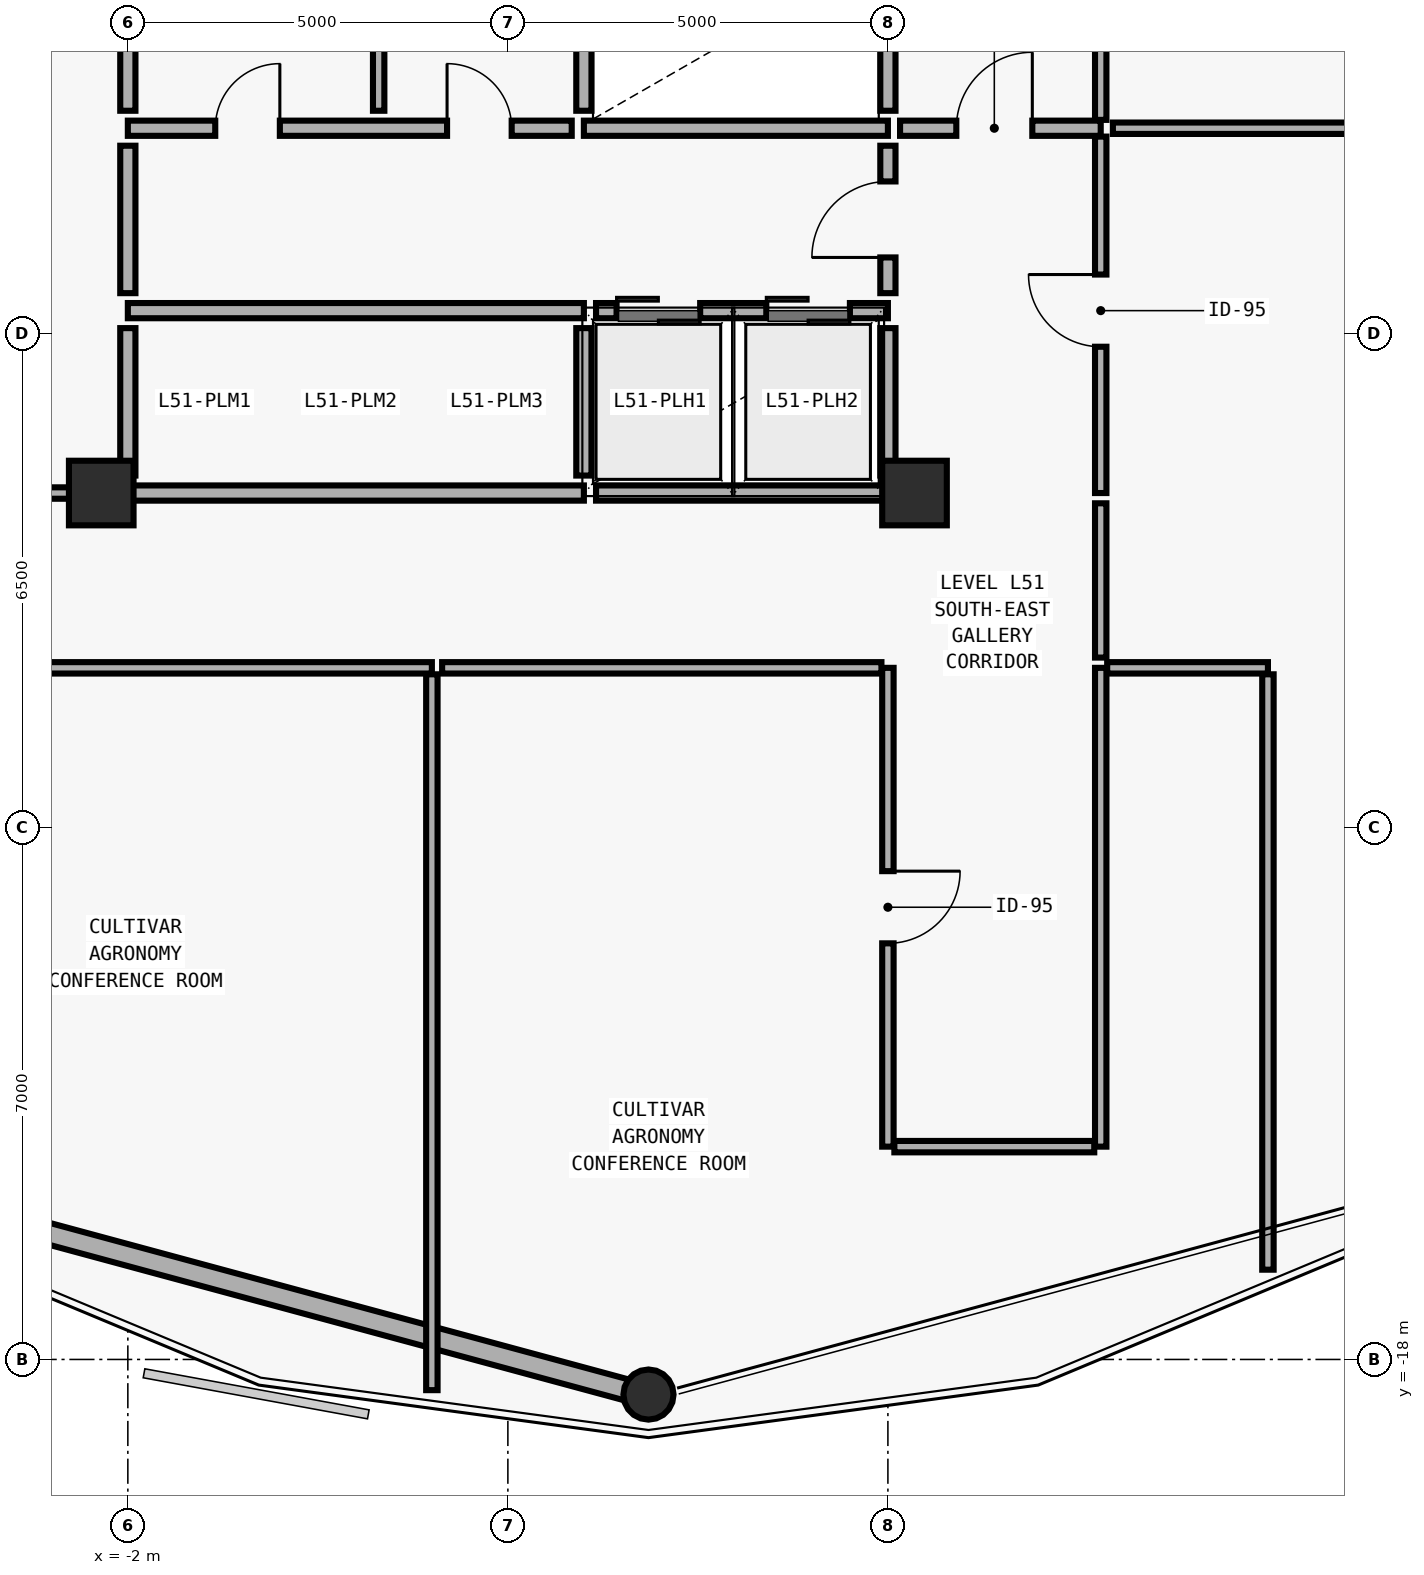
"""IFC4 building model, lengths in metres.
Left out: names, types, materials, properties, quantities, classifications, styles, units other than length and angle.
Written with IfcOpenShell. Run it as: python <this file> out.ifc"""

import sys

from ifc_helpers import new_model, si_unit, direction, frame, frame_2d, origin, origin_2d, place, context, subcontext, project, spatial, rectangle, hollow_circle, extrude, element, fill, save


model = new_model("IFC4")
c1 = context("Model", 3, precision=1e-05, world=origin(), true_north=direction((0.0, 1.0)))
c2 = subcontext(c1, "Body", "Model", "MODEL_VIEW")
j1 = project(units=[si_unit("LENGTHUNIT", "METRE"), si_unit("PLANEANGLEUNIT", "RADIAN")], contexts=[c1])
p1 = place(None, origin())
s1 = spatial("IfcSite", under=j1, at=p1, CompositionType="ELEMENT")
p2 = place(p1, origin())
s2 = spatial("IfcBuilding", under=s1, at=p2, CompositionType="ELEMENT")
p3 = place(p2, frame((0.0, 0.0, 204.0)))
s3 = spatial("IfcBuildingStorey", under=s2, at=p3, CompositionType="ELEMENT", Elevation=204.0)
for number, where, z_axis, x_axis in (
    (1, (-2.35, -6.6, 0.0), (0.0, 0.0, 1.0), (1.0, 0.0, 0.0)),
    (2, (8.35, -6.6, 0.0), (0.0, 0.0, 1.0), (1.0, 0.0, 0.0)),
):
    element("IfcColumn", number, at=place(p3, frame(where, z_axis=z_axis, x_axis=x_axis)), inside=s3, PredefinedType="COLUMN", context=c2, shape_type="SweptSolid", body=[
        extrude(rectangle(XDim=0.85, YDim=0.85, at=origin_2d()), origin(), (0.0, 0.0, 1.0), 3.575),
    ])
p4 = place(p3, frame((4.85, -18.479, 0.0), z_axis=(0.0, 0.00949216266, 0.999954948409), x_axis=(-1.0, 0.0, 0.0)))
e3 = element("IfcColumn", 3, at=p4, inside=s3, PredefinedType="COLUMN", context=c2, shape_type="SweptSolid", body=[
    extrude(hollow_circle(Radius=0.33, WallThickness=0.025, at=origin_2d()), origin(), (0.0, 0.0, 1.0), 3.575),
])
p5 = place(p3, frame((4.575, -18.405, 0.0), z_axis=(0.0, 0.0, 1.0), x_axis=(-0.965320770618, 0.261066676948, 0.0)))
e4 = element("IfcWall", 4, at=p5, inside=s3, PredefinedType="SOLIDWALL", context=c2, shape_type="SweptSolid", body=[
    extrude(rectangle(XDim=9.361, YDim=0.28, at=frame_2d((4.681, 0.0))), origin(), (0.0, 0.0, 1.0), 2.93),
])
p6 = place(p3, frame((4.0, -1.8, 0.0), z_axis=(0.0, 0.0, 1.0), x_axis=(1.0, 0.0, 0.0)))
e5 = element("IfcWall", 5, at=p6, inside=s3, PredefinedType="SOLIDWALL", context=c2, shape_type="SweptSolid", body=[
    extrude(rectangle(XDim=4.0, YDim=0.2, at=frame_2d((2.0, 0.0))), origin(), (0.0, 0.0, 1.0), 3.36),
])
p7 = place(p3, frame((4.0, -1.57, 0.0), z_axis=(0.0, 0.0, 1.0), x_axis=(0.0, 1.0, 0.0)))
e6 = element("IfcWall", 6, at=p7, inside=s3, PredefinedType="SOLIDWALL", context=c2, shape_type="SweptSolid", body=[
    extrude(rectangle(XDim=1.94, YDim=0.2, at=frame_2d((0.97, 0.0))), origin(), (0.0, 0.0, 1.0), 3.36),
])
p8 = place(p3, frame((8.0, -1.57, 0.0), z_axis=(0.0, 0.0, 1.0), x_axis=(0.0, 1.0, 0.0)))
e7 = element("IfcWall", 7, at=p8, inside=s3, PredefinedType="SOLIDWALL", context=c2, shape_type="SweptSolid", body=[
    extrude(rectangle(XDim=2.05, YDim=0.2, at=frame_2d((1.025, 0.0))), origin(), (0.0, 0.0, 1.0), 3.012),
])
p9 = place(p3, frame((-2.0, -4.2, 0.0), z_axis=(0.0, 0.0, 1.0), x_axis=(1.0, 0.0, 0.0)))
e8 = element("IfcWall", 8, at=p9, inside=s3, PredefinedType="SOLIDWALL", context=c2, shape_type="SweptSolid", body=[
    extrude(rectangle(XDim=6.0, YDim=0.2, at=frame_2d((3.0, 0.0))), origin(), (0.0, 0.0, 1.0), 3.36),
])
p10 = place(p3, frame((-2.0, -6.6, 0.0), z_axis=(0.0, 0.0, 1.0), x_axis=(1.0, 0.0, 0.0)))
e9 = element("IfcWall", 9, at=p10, inside=s3, PredefinedType="SOLIDWALL", context=c2, shape_type="SweptSolid", body=[
    extrude(rectangle(XDim=6.0, YDim=0.2, at=frame_2d((3.0, 0.0))), origin(), (0.0, 0.0, 1.0), 3.012),
])
p11 = place(p3, frame((-2.0, -6.37, 0.0), z_axis=(0.0, 0.0, 1.0), x_axis=(0.0, 1.0, 0.0)))
e10 = element("IfcWall", 10, at=p11, inside=s3, PredefinedType="SOLIDWALL", context=c2, shape_type="SweptSolid", body=[
    extrude(rectangle(XDim=1.94, YDim=0.2, at=frame_2d((0.97, 0.0))), origin(), (0.0, 0.0, 1.0), 3.012),
])
p12 = place(p3, frame((4.16, -4.2, 0.0), z_axis=(0.0, 0.0, 1.0), x_axis=(1.0, 0.0, 0.0)))
e11 = element("IfcWall", 11, at=p12, inside=s3, PredefinedType="SOLIDWALL", context=c2, shape_type="SweptSolid", body=[
    extrude(rectangle(XDim=3.84, YDim=0.2, at=frame_2d((1.92, 0.0))), origin(), (0.0, 0.0, 1.0), 3.36),
])
p13 = place(p12, frame((0.27, 0.0, 0.0)))
e12 = element("IfcOpeningElement", 12, at=p13, cuts=e11, PredefinedType="OPENING", context=c2, shape_type="SweptSolid", body=[
    extrude(rectangle(XDim=1.1, YDim=2.2, at=frame_2d((0.55, 1.1))), frame((0.0, 0.11, 0.0), z_axis=(0.0, -1.0, 0.0), x_axis=(1.0, 0.0, 0.0)), (0.0, 0.0, 1.0), 0.22),
])
p14 = place(p12, frame((2.24, 0.0, 0.0)))
e13 = element("IfcOpeningElement", 13, at=p14, cuts=e11, PredefinedType="OPENING", context=c2, shape_type="SweptSolid", body=[
    extrude(rectangle(XDim=1.1, YDim=2.2, at=frame_2d((0.55, 1.1))), frame((0.0, 0.11, 0.0), z_axis=(0.0, -1.0, 0.0), x_axis=(1.0, 0.0, 0.0)), (0.0, 0.0, 1.0), 0.22),
])
p15 = place(p3, frame((4.16, -6.6, 0.0), z_axis=(0.0, 0.0, 1.0), x_axis=(1.0, 0.0, 0.0)))
e14 = element("IfcWall", 14, at=p15, inside=s3, PredefinedType="SOLIDWALL", context=c2, shape_type="SweptSolid", body=[
    extrude(rectangle(XDim=3.84, YDim=0.2, at=frame_2d((1.92, 0.0))), origin(), (0.0, 0.0, 1.0), 3.012),
])
p16 = place(p3, frame((4.0, -6.37, 0.0), z_axis=(0.0, 0.0, 1.0), x_axis=(0.0, 1.0, 0.0)))
e15 = element("IfcWall", 15, at=p16, inside=s3, PredefinedType="SOLIDWALL", context=c2, shape_type="SweptSolid", body=[
    extrude(rectangle(XDim=1.94, YDim=0.2, at=frame_2d((0.97, 0.0))), origin(), (0.0, 0.0, 1.0), 3.36),
])
p17 = place(p3, frame((8.0, -6.37, 0.0), z_axis=(0.0, 0.0, 1.0), x_axis=(0.0, 1.0, 0.0)))
e16 = element("IfcWall", 16, at=p17, inside=s3, PredefinedType="SOLIDWALL", context=c2, shape_type="SweptSolid", body=[
    extrude(rectangle(XDim=1.94, YDim=0.2, at=frame_2d((0.97, 0.0))), origin(), (0.0, 0.0, 1.0), 3.012),
])
p18 = place(p3, frame((8.0, -3.97, 0.0), z_axis=(0.0, 0.0, 1.0), x_axis=(0.0, 1.0, 0.0)))
e17 = element("IfcWall", 17, at=p18, inside=s3, PredefinedType="MOVABLE", context=c2, shape_type="SweptSolid", body=[
    extrude(rectangle(XDim=1.94, YDim=0.2, at=frame_2d((0.97, 0.0))), origin(), (0.0, 0.0, 1.0), 3.012),
])
p19 = place(p18, frame((0.47, 0.0, 0.0)))
e18 = element("IfcOpeningElement", 18, at=p19, cuts=e17, PredefinedType="OPENING", context=c2, shape_type="SweptSolid", body=[
    extrude(rectangle(XDim=1.0, YDim=2.1, at=frame_2d((0.5, 1.05))), frame((0.0, 0.11, 0.0), z_axis=(0.0, -1.0, 0.0), x_axis=(1.0, 0.0, 0.0)), (0.0, 0.0, 1.0), 0.22),
])
p20 = place(p3, frame((-2.0, -1.8, 0.0), z_axis=(0.0, 0.0, 1.0), x_axis=(1.0, 0.0, 0.0)))
e19 = element("IfcWall", 19, at=p20, inside=s3, PredefinedType="MOVABLE", context=c2, shape_type="SweptSolid", body=[
    extrude(rectangle(XDim=5.84, YDim=0.2, at=frame_2d((2.92, 0.0))), origin(), (0.0, 0.0, 1.0), 3.36),
])
p21 = place(p20, frame((1.15, 0.0, 0.0)))
e20 = element("IfcOpeningElement", 20, at=p21, cuts=e19, PredefinedType="OPENING", context=c2, shape_type="SweptSolid", body=[
    extrude(rectangle(XDim=0.85, YDim=2.1, at=frame_2d((0.425, 1.05))), frame((0.0, 0.11, 0.0), z_axis=(0.0, -1.0, 0.0), x_axis=(1.0, 0.0, 0.0)), (0.0, 0.0, 1.0), 0.22),
])
p22 = place(p20, frame((4.2, 0.0, 0.0)))
e21 = element("IfcOpeningElement", 21, at=p22, cuts=e19, PredefinedType="OPENING", context=c2, shape_type="SweptSolid", body=[
    extrude(rectangle(XDim=0.85, YDim=2.1, at=frame_2d((0.425, 1.05))), frame((0.0, 0.11, 0.0), z_axis=(0.0, -1.0, 0.0), x_axis=(1.0, 0.0, 0.0)), (0.0, 0.0, 1.0), 0.22),
])
p23 = place(p3, frame((8.16, -1.8, 0.0), z_axis=(0.0, 0.0, 1.0), x_axis=(1.0, 0.0, 0.0)))
e22 = element("IfcWall", 22, at=p23, inside=s3, PredefinedType="MOVABLE", context=c2, shape_type="SweptSolid", body=[
    extrude(rectangle(XDim=2.64, YDim=0.2, at=frame_2d((1.32, 0.0))), origin(), (0.0, 0.0, 1.0), 3.36),
])
p24 = place(p23, frame((0.74, 0.0, 0.0)))
e23 = element("IfcOpeningElement", 23, at=p24, cuts=e22, PredefinedType="OPENING", context=c2, shape_type="SweptSolid", body=[
    extrude(rectangle(XDim=1.0, YDim=2.1, at=frame_2d((0.5, 1.05))), frame((0.0, 0.11, 0.0), z_axis=(0.0, -1.0, 0.0), x_axis=(1.0, 0.0, 0.0)), (0.0, 0.0, 1.0), 0.22),
])
p25 = place(p3, frame((-12.217, -8.9, 0.0), z_axis=(0.0, 0.0, 1.0), x_axis=(1.0, 0.0, 0.0)))
e24 = element("IfcWall", 24, at=p25, inside=s3, PredefinedType="PARTITIONING", context=c2, shape_type="SweptSolid", body=[
    extrude(rectangle(XDim=14.217, YDim=0.15, at=frame_2d((7.108, 0.0))), origin(), (0.0, 0.0, 1.0), 2.842),
])
p26 = place(p25, frame((6.633, 0.0, 0.0)))
e25 = element("IfcOpeningElement", 25, at=p26, cuts=e24, PredefinedType="OPENING", context=c2, shape_type="SweptSolid", body=[
    extrude(rectangle(XDim=0.95, YDim=2.1, at=frame_2d((0.475, 1.05))), frame((0.0, 0.085, 0.0), z_axis=(0.0, -1.0, 0.0), x_axis=(1.0, 0.0, 0.0)), (0.0, 0.0, 1.0), 0.17),
])
p27 = place(p3, frame((8.0, -8.9, 0.0), z_axis=(0.0, 0.0, 1.0), x_axis=(0.0, -1.0, 0.0)))
e26 = element("IfcWall", 26, at=p27, inside=s3, PredefinedType="PARTITIONING", context=c2, shape_type="SweptSolid", body=[
    extrude(rectangle(XDim=6.3, YDim=0.15, at=frame_2d((3.15, 0.0))), origin(), (0.0, 0.0, 1.0), 2.842),
])
p28 = place(p27, frame((2.675, 0.0, 0.0)))
e27 = element("IfcOpeningElement", 27, at=p28, cuts=e26, PredefinedType="OPENING", context=c2, shape_type="SweptSolid", body=[
    extrude(rectangle(XDim=0.95, YDim=2.1, at=frame_2d((0.475, 1.05))), frame((0.0, 0.085, 0.0), z_axis=(0.0, -1.0, 0.0), x_axis=(1.0, 0.0, 0.0)), (0.0, 0.0, 1.0), 0.17),
])
p29 = place(p3, frame((10.8, -6.6, 0.0), z_axis=(0.0, 0.0, 1.0), x_axis=(0.0, 1.0, 0.0)))
e28 = element("IfcWall", 28, at=p29, inside=s3, PredefinedType="PARTITIONING", context=c2, shape_type="SweptSolid", body=[
    extrude(rectangle(XDim=4.69, YDim=0.15, at=frame_2d((2.345, 0.0))), origin(), (0.0, 0.0, 1.0), 3.36),
])
p30 = place(p29, frame((1.925, 0.0, 0.0)))
e29 = element("IfcOpeningElement", 29, at=p30, cuts=e28, PredefinedType="OPENING", context=c2, shape_type="SweptSolid", body=[
    extrude(rectangle(XDim=0.95, YDim=2.1, at=frame_2d((0.475, 1.05))), frame((0.0, 0.085, 0.0), z_axis=(0.0, -1.0, 0.0), x_axis=(1.0, 0.0, 0.0)), (0.0, 0.0, 1.0), 0.17),
])
p31 = place(p3, frame((10.8, -1.69, 0.0), z_axis=(0.0, 0.0, 1.0), x_axis=(0.0, 1.0, 0.0)))
e30 = element("IfcWall", 30, at=p31, inside=s3, PredefinedType="PARTITIONING", context=c2, shape_type="SweptSolid", body=[
    extrude(rectangle(XDim=14.19, YDim=0.15, at=frame_2d((7.095, 0.0))), origin(), (0.0, 0.0, 1.0), 3.36),
])
p32 = place(p31, frame((6.565, 0.0, 0.0)))
e31 = element("IfcOpeningElement", 31, at=p32, cuts=e30, PredefinedType="OPENING", context=c2, shape_type="SweptSolid", body=[
    extrude(rectangle(XDim=0.95, YDim=2.1, at=frame_2d((0.475, 1.05))), frame((0.0, 0.085, 0.0), z_axis=(0.0, -1.0, 0.0), x_axis=(1.0, 0.0, 0.0)), (0.0, 0.0, 1.0), 0.17),
])
p33 = place(p3, frame((-2.0, -3.97, 0.0), z_axis=(0.0, 0.0, 1.0), x_axis=(0.0, 1.0, 0.0)))
e32 = element("IfcWall", 32, at=p33, inside=s3, PredefinedType="MOVABLE", context=c2, shape_type="SweptSolid", body=[
    extrude(rectangle(XDim=1.94, YDim=0.2, at=frame_2d((0.97, 0.0))), origin(), (0.0, 0.0, 1.0), 3.012),
])
p34 = place(p3, frame((1.3, -1.57, 0.0), z_axis=(0.0, 0.0, 1.0), x_axis=(0.0, 1.0, 0.0)))
e33 = element("IfcWall", 33, at=p34, inside=s3, PredefinedType="PARTITIONING", context=c2, shape_type="SweptSolid", body=[
    extrude(rectangle(XDim=1.94, YDim=0.15, at=frame_2d((0.97, 0.0))), origin(), (0.0, 0.0, 1.0), 3.36),
])
p35 = place(p3, frame((-2.0, -1.57, 0.0), z_axis=(0.0, 0.0, 1.0), x_axis=(0.0, 1.0, 0.0)))
e34 = element("IfcWall", 34, at=p35, inside=s3, PredefinedType="MOVABLE", context=c2, shape_type="SweptSolid", body=[
    extrude(rectangle(XDim=2.05, YDim=0.2, at=frame_2d((1.025, 0.0))), origin(), (0.0, 0.0, 1.0), 3.012),
])
p36 = place(p3, frame((2.0, -8.985, 0.0), z_axis=(0.0, 0.0, 1.0), x_axis=(0.0, -1.0, 0.0)))
e35 = element("IfcWall", 35, at=p36, inside=s3, PredefinedType="PARTITIONING", context=c2, shape_type="SweptSolid", body=[
    extrude(rectangle(XDim=9.419, YDim=0.15, at=frame_2d((4.709, 0.0))), origin(), (0.0, 0.0, 1.0), 3.36),
])
p37 = place(p3, frame((10.8, -15.2, 0.0), z_axis=(0.0, 0.0, 1.0), x_axis=(0.0, 1.0, 0.0)))
e36 = element("IfcWall", 36, at=p37, inside=s3, PredefinedType="PARTITIONING", context=c2, shape_type="SweptSolid", body=[
    extrude(rectangle(XDim=6.3, YDim=0.15, at=frame_2d((3.15, 0.0))), origin(), (0.0, 0.0, 1.0), 3.36),
])
p38 = place(p3, frame((2.135, -8.9, 0.0), z_axis=(0.0, 0.0, 1.0), x_axis=(1.0, 0.0, 0.0)))
e37 = element("IfcWall", 37, at=p38, inside=s3, PredefinedType="PARTITIONING", context=c2, shape_type="SweptSolid", body=[
    extrude(rectangle(XDim=5.78, YDim=0.15, at=frame_2d((2.89, 0.0))), origin(), (0.0, 0.0, 1.0), 3.36),
])
p39 = place(p3, frame((8.085, -15.2, 0.0), z_axis=(0.0, 0.0, 1.0), x_axis=(1.0, 0.0, 0.0)))
e38 = element("IfcWall", 38, at=p39, inside=s3, PredefinedType="PARTITIONING", context=c2, shape_type="SweptSolid", body=[
    extrude(rectangle(XDim=2.63, YDim=0.15, at=frame_2d((1.315, 0.0))), origin(), (0.0, 0.0, 1.0), 3.36),
])
p40 = place(p3, frame((10.885, -8.9, 0.0), z_axis=(0.0, 0.0, 1.0), x_axis=(1.0, 0.0, 0.0)))
e39 = element("IfcWall", 39, at=p40, inside=s3, PredefinedType="PARTITIONING", context=c2, shape_type="SweptSolid", body=[
    extrude(rectangle(XDim=2.115, YDim=0.15, at=frame_2d((1.058, 0.0))), origin(), (0.0, 0.0, 1.0), 3.36),
])
p41 = place(p3, frame((13.0, -8.985, 0.0), z_axis=(0.0, 0.0, 1.0), x_axis=(0.0, -1.0, 0.0)))
e40 = element("IfcWall", 40, at=p41, inside=s3, PredefinedType="PARTITIONING", context=c2, shape_type="SweptSolid", body=[
    extrude(rectangle(XDim=7.834, YDim=0.15, at=frame_2d((3.917, 0.0))), origin(), (0.0, 0.0, 1.0), 3.36),
])
p42 = place(p3, frame((10.8, -8.765, 0.0), z_axis=(0.0, 0.0, 1.0), x_axis=(0.0, 1.0, 0.0)))
e41 = element("IfcWall", 41, at=p42, inside=s3, PredefinedType="PARTITIONING", context=c2, shape_type="SweptSolid", body=[
    extrude(rectangle(XDim=2.03, YDim=0.15, at=frame_2d((1.015, 0.0))), origin(), (0.0, 0.0, 1.0), 3.36),
])
p43 = place(p3, frame((10.96, -1.8, 0.0), z_axis=(0.0, 0.0, 1.0), x_axis=(1.0, 0.0, 0.0)))
e42 = element("IfcWall", 42, at=p43, inside=s3, PredefinedType="PARTITIONING", context=c2, shape_type="SweptSolid", body=[
    extrude(rectangle(XDim=13.244, YDim=0.15, at=frame_2d((6.622, 0.0))), origin(), (0.0, 0.0, 1.0), 3.36),
])
p44 = place(p3, frame((-2.16, -6.6, 0.0), z_axis=(0.0, 0.0, 1.0), x_axis=(-1.0, 0.0, 0.0)))
e43 = element("IfcWall", 43, at=p44, inside=s3, PredefinedType="PARTITIONING", context=c2, shape_type="SweptSolid", body=[
    extrude(rectangle(XDim=2.305, YDim=0.15, at=frame_2d((1.153, 0.0))), origin(), (0.0, 0.0, 1.0), 2.842),
])
p45 = place(p19, origin())
e44 = element("IfcDoor", 44, at=p45, inside=s3, OperationType="SINGLE_SWING_LEFT", PredefinedType="DOOR", context=c2, shape_type="SweptSolid", body=[
    extrude(rectangle(XDim=1.0, YDim=2.1, at=frame_2d((0.5, 1.05))), frame((0.0, 0.025, 0.0), z_axis=(0.0, -1.0, 0.0), x_axis=(1.0, 0.0, 0.0)), (0.0, 0.0, 1.0), 0.05),
])
fill(e18, e44)
p46 = place(p21, origin())
e45 = element("IfcDoor", 45, at=p46, inside=s3, OperationType="SINGLE_SWING_RIGHT", PredefinedType="DOOR", context=c2, shape_type="SweptSolid", body=[
    extrude(rectangle(XDim=0.85, YDim=2.1, at=frame_2d((0.425, 1.05))), frame((0.0, 0.025, 0.0), z_axis=(0.0, -1.0, 0.0), x_axis=(1.0, 0.0, 0.0)), (0.0, 0.0, 1.0), 0.05),
])
fill(e20, e45)
p47 = place(p22, origin())
e46 = element("IfcDoor", 46, at=p47, inside=s3, OperationType="SINGLE_SWING_LEFT", PredefinedType="DOOR", context=c2, shape_type="SweptSolid", body=[
    extrude(rectangle(XDim=0.85, YDim=2.1, at=frame_2d((0.425, 1.05))), frame((0.0, 0.025, 0.0), z_axis=(0.0, -1.0, 0.0), x_axis=(1.0, 0.0, 0.0)), (0.0, 0.0, 1.0), 0.05),
])
fill(e21, e46)
p48 = place(p24, origin())
e47 = element("IfcDoor", 47, at=p48, inside=s3, OperationType="SINGLE_SWING_RIGHT", PredefinedType="DOOR", context=c2, shape_type="SweptSolid", body=[
    extrude(rectangle(XDim=1.0, YDim=2.1, at=frame_2d((0.5, 1.05))), frame((0.0, 0.025, 0.0), z_axis=(0.0, -1.0, 0.0), x_axis=(1.0, 0.0, 0.0)), (0.0, 0.0, 1.0), 0.05),
])
fill(e23, e47)
p49 = place(p28, origin())
e48 = element("IfcDoor", 48, at=p49, inside=s3, OperationType="SINGLE_SWING_LEFT", PredefinedType="DOOR", context=c2, shape_type="SweptSolid", body=[
    extrude(rectangle(XDim=0.95, YDim=2.1, at=frame_2d((0.475, 1.05))), frame((0.0, 0.025, 0.0), z_axis=(0.0, -1.0, 0.0), x_axis=(1.0, 0.0, 0.0)), (0.0, 0.0, 1.0), 0.05),
])
fill(e27, e48)
p50 = place(p30, origin())
e49 = element("IfcDoor", 49, at=p50, inside=s3, OperationType="SINGLE_SWING_RIGHT", PredefinedType="DOOR", context=c2, shape_type="SweptSolid", body=[
    extrude(rectangle(XDim=0.95, YDim=2.1, at=frame_2d((0.475, 1.05))), frame((0.0, 0.025, 0.0), z_axis=(0.0, -1.0, 0.0), x_axis=(1.0, 0.0, 0.0)), (0.0, 0.0, 1.0), 0.05),
])
fill(e29, e49)
p51 = place(p13, origin())
e50 = element("IfcDoor", 50, at=p51, inside=s3, OperationType="DOUBLE_DOOR_SLIDING", PredefinedType="DOOR", context=c2, shape_type="SweptSolid", body=[
    extrude(rectangle(XDim=1.1, YDim=2.2, at=frame_2d((0.55, 1.1))), frame((0.0, 0.025, 0.0), z_axis=(0.0, -1.0, 0.0), x_axis=(1.0, 0.0, 0.0)), (0.0, 0.0, 1.0), 0.05),
])
fill(e12, e50)
p52 = place(p14, origin())
e51 = element("IfcDoor", 51, at=p52, inside=s3, OperationType="DOUBLE_DOOR_SLIDING", PredefinedType="DOOR", context=c2, shape_type="SweptSolid", body=[
    extrude(rectangle(XDim=1.1, YDim=2.2, at=frame_2d((0.55, 1.1))), frame((0.0, 0.025, 0.0), z_axis=(0.0, -1.0, 0.0), x_axis=(1.0, 0.0, 0.0)), (0.0, 0.0, 1.0), 0.05),
])
fill(e13, e51)
save(model, sys.argv[1])
